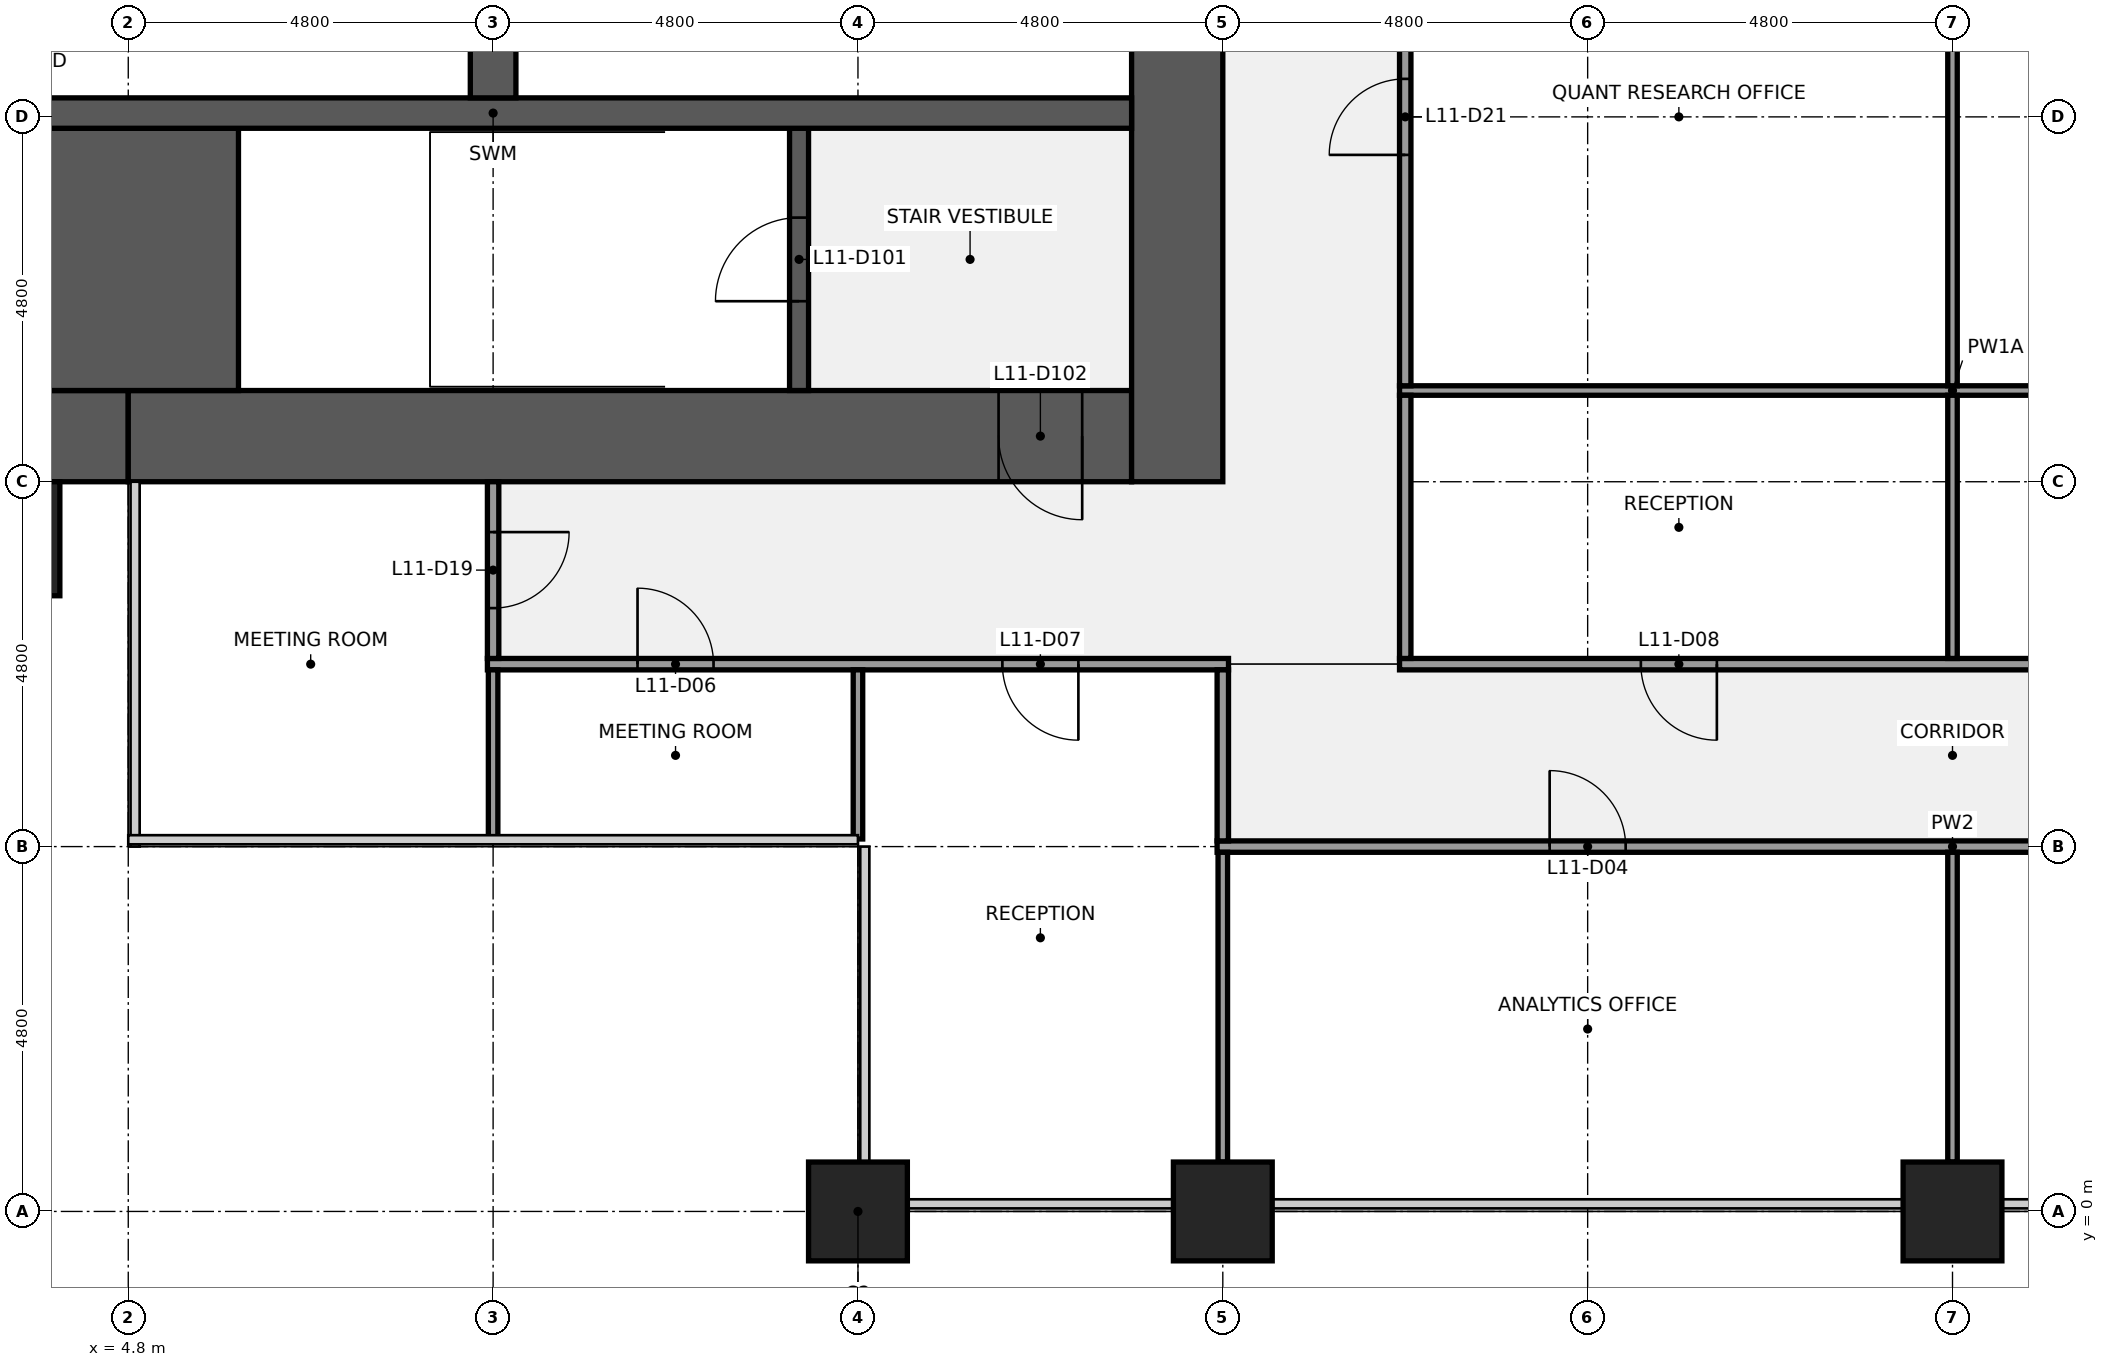
"""IFC4 building model, lengths in metres.
Left out: names, types, materials, properties, quantities, classifications, styles, units other than length and angle.
Written with IfcOpenShell. Run it as: python <this file> out.ifc"""

import sys

from ifc_helpers import new_model, si_unit, direction, frame, frame_2d, origin, origin_2d, place, context, subcontext, project, spatial, rectangle, extrude, element, fill, save


model = new_model("IFC4")
c1 = context("Model", 3, precision=1e-05, world=origin(), true_north=direction((0.0, 1.0)))
c2 = subcontext(c1, "Body", "Model", "MODEL_VIEW")
j1 = project(units=[si_unit("LENGTHUNIT", "METRE"), si_unit("PLANEANGLEUNIT", "RADIAN")], contexts=[c1])
p1 = place(None, origin())
s1 = spatial("IfcSite", under=j1, at=p1, CompositionType="ELEMENT")
p2 = place(p1, origin())
s2 = spatial("IfcBuilding", under=s1, at=p2, CompositionType="ELEMENT")
p3 = place(p2, frame((0.0, 0.0, 55.0)))
s3 = spatial("IfcBuildingStorey", under=s2, at=p3, CompositionType="ELEMENT", Elevation=55.0)
for number, where, z_axis, x_axis in (
    (1, (14.4, 0.0, 0.0), (0.0, 0.0, 1.0), (1.0, 0.0, 0.0)),
    (2, (19.2, 0.0, 0.0), (0.0, 0.0, 1.0), (1.0, 0.0, 0.0)),
    (3, (28.8, 0.0, 0.0), (0.0, 0.0, 1.0), (1.0, 0.0, 0.0)),
):
    element("IfcColumn", number, at=place(p3, frame(where, z_axis=z_axis, x_axis=x_axis)), inside=s3, PredefinedType="COLUMN", context=c2, shape_type="SweptSolid", body=[
        extrude(rectangle(XDim=1.3, YDim=1.3, at=origin_2d()), origin(), (0.0, 0.0, 1.0), 4.0),
    ])
p4 = place(p3, frame((4.8, 10.2, 0.0), z_axis=(0.0, 0.0, 1.0), x_axis=(-1.0, 0.0, 0.0)))
e4 = element("IfcWall", 4, at=p4, inside=s3, PredefinedType="SHEAR", context=c2, shape_type="SweptSolid", body=[
    extrude(rectangle(XDim=3.6, YDim=1.2, at=frame_2d((1.8, 0.0))), origin(), (0.0, 0.0, 1.0), 3.84),
])
p5 = place(p3, frame((18.0, 10.2, 0.0), z_axis=(0.0, 0.0, 1.0), x_axis=(-1.0, 0.0, 0.0)))
e5 = element("IfcWall", 5, at=p5, inside=s3, PredefinedType="SHEAR", context=c2, shape_type="SweptSolid", body=[
    extrude(rectangle(XDim=13.2, YDim=1.2, at=frame_2d((6.6, 0.0))), origin(), (0.0, 0.0, 1.0), 3.84),
])
p6 = place(p5, frame((0.65, 0.0, 0.0)))
e6 = element("IfcOpeningElement", 6, at=p6, cuts=e5, PredefinedType="OPENING", context=c2, shape_type="SweptSolid", body=[
    extrude(rectangle(XDim=1.1, YDim=2.1, at=frame_2d((0.55, 1.05))), frame((0.0, 0.61, 0.0), z_axis=(0.0, -1.0, 0.0), x_axis=(1.0, 0.0, 0.0)), (0.0, 0.0, 1.0), 1.22),
])
p7 = place(p3, frame((18.6, 38.4, 0.0), z_axis=(0.0, 0.0, 1.0), x_axis=(0.0, -1.0, 0.0)))
e7 = element("IfcWall", 7, at=p7, inside=s3, PredefinedType="SHEAR", context=c2, shape_type="SweptSolid", body=[
    extrude(rectangle(XDim=28.8, YDim=1.2, at=frame_2d((14.4, 0.0))), origin(), (0.0, 0.0, 1.0), 3.84),
])
p8 = place(p7, frame((18.3, 0.0, 0.0)))
e8 = element("IfcOpeningElement", 8, at=p8, cuts=e7, PredefinedType="OPENING", context=c2, shape_type="SweptSolid", body=[
    extrude(rectangle(XDim=1.8, YDim=2.1, at=frame_2d((0.9, 1.05))), frame((0.0, 0.61, 0.0), z_axis=(0.0, -1.0, 0.0), x_axis=(1.0, 0.0, 0.0)), (0.0, 0.0, 1.0), 1.22),
])
p9 = place(p7, frame((8.7, 0.0, 0.0)))
e9 = element("IfcOpeningElement", 9, at=p9, cuts=e7, PredefinedType="OPENING", context=c2, shape_type="SweptSolid", body=[
    extrude(rectangle(XDim=1.8, YDim=2.1, at=frame_2d((0.9, 1.05))), frame((0.0, 0.61, 0.0), z_axis=(0.0, -1.0, 0.0), x_axis=(1.0, 0.0, 0.0)), (0.0, 0.0, 1.0), 1.22),
])
p10 = place(p3, frame((1.2, 12.525, 0.0), z_axis=(0.0, 0.0, 1.0), x_axis=(1.0, 0.0, 0.0)))
e10 = element("IfcWall", 10, at=p10, inside=s3, PredefinedType="SHEAR", context=c2, shape_type="SweptSolid", body=[
    extrude(rectangle(XDim=5.05, YDim=3.45, at=frame_2d((2.525, 0.0))), origin(), (0.0, 0.0, 1.0), 3.84),
])
p11 = place(p3, frame((13.625, 10.8, 0.0), z_axis=(0.0, 0.0, 1.0), x_axis=(0.0, 1.0, 0.0)))
e11 = element("IfcWall", 11, at=p11, inside=s3, PredefinedType="SHEAR", context=c2, shape_type="SweptSolid", body=[
    extrude(rectangle(XDim=3.45, YDim=0.25, at=frame_2d((1.725, 0.0))), origin(), (0.0, 0.0, 1.0), 3.84),
])
p12 = place(p11, frame((1.175, 0.0, 0.0)))
e12 = element("IfcOpeningElement", 12, at=p12, cuts=e11, PredefinedType="OPENING", context=c2, shape_type="SweptSolid", body=[
    extrude(rectangle(XDim=1.1, YDim=2.1, at=frame_2d((0.55, 1.05))), frame((0.0, 0.135, 0.0), z_axis=(0.0, -1.0, 0.0), x_axis=(1.0, 0.0, 0.0)), (0.0, 0.0, 1.0), 0.27),
])
p13 = place(p3, frame((1.2, 14.45, 0.0), z_axis=(0.0, 0.0, 1.0), x_axis=(1.0, 0.0, 0.0)))
e13 = element("IfcWall", 13, at=p13, inside=s3, PredefinedType="SHEAR", context=c2, shape_type="SweptSolid", body=[
    extrude(rectangle(XDim=16.8, YDim=0.4, at=frame_2d((8.4, 0.0))), origin(), (0.0, 0.0, 1.0), 3.84),
])
p14 = place(p3, frame((9.6, 14.65, 0.0), z_axis=(0.0, 0.0, 1.0), x_axis=(0.0, 1.0, 0.0)))
e14 = element("IfcWall", 14, at=p14, inside=s3, PredefinedType="SHEAR", context=c2, shape_type="SweptSolid", body=[
    extrude(rectangle(XDim=2.6, YDim=0.6, at=frame_2d((1.3, 0.0))), origin(), (0.0, 0.0, 1.0), 3.84),
])
p15 = place(p3, frame((19.125, 4.8, 0.0), z_axis=(0.0, 0.0, 1.0), x_axis=(1.0, 0.0, 0.0)))
e15 = element("IfcWall", 15, at=p15, inside=s3, PredefinedType="PARTITIONING", context=c2, shape_type="SweptSolid", body=[
    extrude(rectangle(XDim=19.35, YDim=0.15, at=frame_2d((9.675, 0.0))), origin(), (0.0, 0.0, 1.0), 2.849),
])
p16 = place(p15, frame((4.375, 0.0, 0.0)))
e16 = element("IfcOpeningElement", 16, at=p16, cuts=e15, PredefinedType="OPENING", context=c2, shape_type="SweptSolid", body=[
    extrude(rectangle(XDim=1.0, YDim=2.1, at=frame_2d((0.5, 1.05))), frame((0.0, 0.085, 0.0), z_axis=(0.0, -1.0, 0.0), x_axis=(1.0, 0.0, 0.0)), (0.0, 0.0, 1.0), 0.17),
])
p17 = place(p15, frame((13.975, 0.0, 0.0)))
e17 = element("IfcOpeningElement", 17, at=p17, cuts=e15, PredefinedType="OPENING", context=c2, shape_type="SweptSolid", body=[
    extrude(rectangle(XDim=1.0, YDim=2.1, at=frame_2d((0.5, 1.05))), frame((0.0, 0.085, 0.0), z_axis=(0.0, -1.0, 0.0), x_axis=(1.0, 0.0, 0.0)), (0.0, 0.0, 1.0), 0.17),
])
p18 = place(p3, frame((9.525, 7.2, 0.0), z_axis=(0.0, 0.0, 1.0), x_axis=(1.0, 0.0, 0.0)))
e18 = element("IfcWall", 18, at=p18, inside=s3, PredefinedType="PARTITIONING", context=c2, shape_type="SweptSolid", body=[
    extrude(rectangle(XDim=9.75, YDim=0.15, at=frame_2d((4.875, 0.0))), origin(), (0.0, 0.0, 1.0), 2.849),
])
p19 = place(p18, frame((1.975, 0.0, 0.0)))
e19 = element("IfcOpeningElement", 19, at=p19, cuts=e18, PredefinedType="OPENING", context=c2, shape_type="SweptSolid", body=[
    extrude(rectangle(XDim=1.0, YDim=2.1, at=frame_2d((0.5, 1.05))), frame((0.0, 0.085, 0.0), z_axis=(0.0, -1.0, 0.0), x_axis=(1.0, 0.0, 0.0)), (0.0, 0.0, 1.0), 0.17),
])
p20 = place(p18, frame((6.775, 0.0, 0.0)))
e20 = element("IfcOpeningElement", 20, at=p20, cuts=e18, PredefinedType="OPENING", context=c2, shape_type="SweptSolid", body=[
    extrude(rectangle(XDim=1.0, YDim=2.1, at=frame_2d((0.5, 1.05))), frame((0.0, 0.085, 0.0), z_axis=(0.0, -1.0, 0.0), x_axis=(1.0, 0.0, 0.0)), (0.0, 0.0, 1.0), 0.17),
])
p21 = place(p3, frame((21.525, 7.2, 0.0), z_axis=(0.0, 0.0, 1.0), x_axis=(1.0, 0.0, 0.0)))
e21 = element("IfcWall", 21, at=p21, inside=s3, PredefinedType="PARTITIONING", context=c2, shape_type="SweptSolid", body=[
    extrude(rectangle(XDim=14.55, YDim=0.15, at=frame_2d((7.275, 0.0))), origin(), (0.0, 0.0, 1.0), 2.849),
])
p22 = place(p21, frame((3.175, 0.0, 0.0)))
e22 = element("IfcOpeningElement", 22, at=p22, cuts=e21, PredefinedType="OPENING", context=c2, shape_type="SweptSolid", body=[
    extrude(rectangle(XDim=1.0, YDim=2.1, at=frame_2d((0.5, 1.05))), frame((0.0, 0.085, 0.0), z_axis=(0.0, -1.0, 0.0), x_axis=(1.0, 0.0, 0.0)), (0.0, 0.0, 1.0), 0.17),
])
p23 = place(p21, frame((10.375, 0.0, 0.0)))
e23 = element("IfcOpeningElement", 23, at=p23, cuts=e21, PredefinedType="OPENING", context=c2, shape_type="SweptSolid", body=[
    extrude(rectangle(XDim=1.0, YDim=2.1, at=frame_2d((0.5, 1.05))), frame((0.0, 0.085, 0.0), z_axis=(0.0, -1.0, 0.0), x_axis=(1.0, 0.0, 0.0)), (0.0, 0.0, 1.0), 0.17),
])
p24 = place(p3, frame((21.525, 10.8, 0.0), z_axis=(0.0, 0.0, 1.0), x_axis=(1.0, 0.0, 0.0)))
e24 = element("IfcWall", 24, at=p24, inside=s3, PredefinedType="PARTITIONING", context=c2, shape_type="SweptSolid", body=[
    extrude(rectangle(XDim=14.55, YDim=0.125, at=frame_2d((7.275, 0.0))), origin(), (0.0, 0.0, 1.0), 2.849),
])
p25 = place(p3, frame((9.6, 4.9, 0.0), z_axis=(0.0, 0.0, 1.0), x_axis=(0.0, 1.0, 0.0)))
e25 = element("IfcWall", 25, at=p25, inside=s3, PredefinedType="PARTITIONING", context=c2, shape_type="SweptSolid", body=[
    extrude(rectangle(XDim=2.225, YDim=0.125, at=frame_2d((1.113, 0.0))), origin(), (0.0, 0.0, 1.0), 2.849),
])
p26 = place(p3, frame((9.6, 7.275, 0.0), z_axis=(0.0, 0.0, 1.0), x_axis=(0.0, 1.0, 0.0)))
e26 = element("IfcWall", 26, at=p26, inside=s3, PredefinedType="PARTITIONING", context=c2, shape_type="SweptSolid", body=[
    extrude(rectangle(XDim=2.325, YDim=0.15, at=frame_2d((1.163, 0.0))), origin(), (0.0, 0.0, 1.0), 2.849),
])
p27 = place(p26, frame((0.663, 0.0, 0.0)))
e27 = element("IfcOpeningElement", 27, at=p27, cuts=e26, PredefinedType="OPENING", context=c2, shape_type="SweptSolid", body=[
    extrude(rectangle(XDim=1.0, YDim=2.1, at=frame_2d((0.5, 1.05))), frame((0.0, 0.085, 0.0), z_axis=(0.0, -1.0, 0.0), x_axis=(1.0, 0.0, 0.0)), (0.0, 0.0, 1.0), 0.17),
])
p28 = place(p3, frame((14.4, 4.9, 0.0), z_axis=(0.0, 0.0, 1.0), x_axis=(0.0, 1.0, 0.0)))
e28 = element("IfcWall", 28, at=p28, inside=s3, PredefinedType="PARTITIONING", context=c2, shape_type="SweptSolid", body=[
    extrude(rectangle(XDim=2.225, YDim=0.125, at=frame_2d((1.113, 0.0))), origin(), (0.0, 0.0, 1.0), 2.849),
])
p29 = place(p3, frame((19.2, 0.65, 0.0), z_axis=(0.0, 0.0, 1.0), x_axis=(0.0, 1.0, 0.0)))
e29 = element("IfcWall", 29, at=p29, inside=s3, PredefinedType="PARTITIONING", context=c2, shape_type="SweptSolid", body=[
    extrude(rectangle(XDim=4.075, YDim=0.125, at=frame_2d((2.038, 0.0))), origin(), (0.0, 0.0, 1.0), 2.849),
])
p30 = place(p3, frame((19.2, 4.875, 0.0), z_axis=(0.0, 0.0, 1.0), x_axis=(0.0, 1.0, 0.0)))
e30 = element("IfcWall", 30, at=p30, inside=s3, PredefinedType="PARTITIONING", context=c2, shape_type="SweptSolid", body=[
    extrude(rectangle(XDim=2.25, YDim=0.15, at=frame_2d((1.125, 0.0))), origin(), (0.0, 0.0, 1.0), 2.849),
])
p31 = place(p3, frame((21.6, 7.275, 0.0), z_axis=(0.0, 0.0, 1.0), x_axis=(0.0, 1.0, 0.0)))
e31 = element("IfcWall", 31, at=p31, inside=s3, PredefinedType="PARTITIONING", context=c2, shape_type="SweptSolid", body=[
    extrude(rectangle(XDim=3.463, YDim=0.15, at=frame_2d((1.731, 0.0))), origin(), (0.0, 0.0, 1.0), 2.849),
])
p32 = place(p3, frame((21.6, 10.863, 0.0), z_axis=(0.0, 0.0, 1.0), x_axis=(0.0, 1.0, 0.0)))
e32 = element("IfcWall", 32, at=p32, inside=s3, PredefinedType="PARTITIONING", context=c2, shape_type="SweptSolid", body=[
    extrude(rectangle(XDim=7.075, YDim=0.15, at=frame_2d((3.538, 0.0))), origin(), (0.0, 0.0, 1.0), 2.849),
])
p33 = place(p32, frame((3.038, 0.0, 0.0)))
e33 = element("IfcOpeningElement", 33, at=p33, cuts=e32, PredefinedType="OPENING", context=c2, shape_type="SweptSolid", body=[
    extrude(rectangle(XDim=1.0, YDim=2.1, at=frame_2d((0.5, 1.05))), frame((0.0, 0.085, 0.0), z_axis=(0.0, -1.0, 0.0), x_axis=(1.0, 0.0, 0.0)), (0.0, 0.0, 1.0), 0.17),
])
p34 = place(p3, frame((28.8, 0.65, 0.0), z_axis=(0.0, 0.0, 1.0), x_axis=(0.0, 1.0, 0.0)))
e34 = element("IfcWall", 34, at=p34, inside=s3, PredefinedType="PARTITIONING", context=c2, shape_type="SweptSolid", body=[
    extrude(rectangle(XDim=4.075, YDim=0.125, at=frame_2d((2.038, 0.0))), origin(), (0.0, 0.0, 1.0), 2.849),
])
p35 = place(p3, frame((28.8, 7.275, 0.0), z_axis=(0.0, 0.0, 1.0), x_axis=(0.0, 1.0, 0.0)))
e35 = element("IfcWall", 35, at=p35, inside=s3, PredefinedType="PARTITIONING", context=c2, shape_type="SweptSolid", body=[
    extrude(rectangle(XDim=3.463, YDim=0.125, at=frame_2d((1.731, 0.0))), origin(), (0.0, 0.0, 1.0), 2.849),
])
p36 = place(p3, frame((28.8, 10.863, 0.0), z_axis=(0.0, 0.0, 1.0), x_axis=(0.0, 1.0, 0.0)))
e36 = element("IfcWall", 36, at=p36, inside=s3, PredefinedType="PARTITIONING", context=c2, shape_type="SweptSolid", body=[
    extrude(rectangle(XDim=7.075, YDim=0.125, at=frame_2d((3.538, 0.0))), origin(), (0.0, 0.0, 1.0), 2.849),
])
p37 = place(p3, frame((2.4, 8.85, 0.0), z_axis=(0.0, 0.0, 1.0), x_axis=(1.0, 0.0, 0.0)))
e37 = element("IfcColumn", 37, at=p37, inside=s3, PredefinedType="PILASTER", context=c2, shape_type="SweptSolid", body=[
    extrude(rectangle(XDim=3.0, YDim=1.5, at=origin_2d()), origin(), (0.0, 0.0, 1.0), 4.0),
])
for number, where, z_axis, x_axis in (
    (38, (14.4, -1.075, 0.0), (0.0, 0.0, 1.0), (1.0, 0.0, 0.0)),
    (39, (19.2, -1.075, 0.0), (0.0, 0.0, 1.0), (1.0, 0.0, 0.0)),
):
    element("IfcColumn", number, at=place(p3, frame(where, z_axis=z_axis, x_axis=x_axis)), inside=s3, PredefinedType="PILASTER", context=c2, shape_type="SweptSolid", body=[
        extrude(rectangle(XDim=4.2, YDim=0.85, at=origin_2d()), origin(), (0.0, 0.0, 1.0), 4.0),
    ])
p38 = place(p12, origin())
e40 = element("IfcDoor", 40, at=p38, inside=s3, OperationType="SINGLE_SWING_LEFT", PredefinedType="DOOR", context=c2, shape_type="SweptSolid", body=[
    extrude(rectangle(XDim=1.1, YDim=2.1, at=frame_2d((0.55, 1.05))), frame((0.0, 0.025, 0.0), z_axis=(0.0, -1.0, 0.0), x_axis=(1.0, 0.0, 0.0)), (0.0, 0.0, 1.0), 0.05),
])
fill(e12, e40)
p39 = place(p6, origin())
e41 = element("IfcDoor", 41, at=p39, inside=s3, OperationType="SINGLE_SWING_LEFT", PredefinedType="DOOR", context=c2, shape_type="SweptSolid", body=[
    extrude(rectangle(XDim=1.1, YDim=2.1, at=frame_2d((0.55, 1.05))), frame((0.0, 0.025, 0.0), z_axis=(0.0, -1.0, 0.0), x_axis=(1.0, 0.0, 0.0)), (0.0, 0.0, 1.0), 0.05),
])
fill(e6, e41)
p40 = place(p16, origin())
e42 = element("IfcDoor", 42, at=p40, inside=s3, OperationType="SINGLE_SWING_LEFT", PredefinedType="DOOR", context=c2, shape_type="SweptSolid", body=[
    extrude(rectangle(XDim=1.0, YDim=2.1, at=frame_2d((0.5, 1.05))), frame((0.0, 0.025, 0.0), z_axis=(0.0, -1.0, 0.0), x_axis=(1.0, 0.0, 0.0)), (0.0, 0.0, 1.0), 0.05),
])
fill(e16, e42)
p41 = place(p19, origin())
e43 = element("IfcDoor", 43, at=p41, inside=s3, OperationType="SINGLE_SWING_LEFT", PredefinedType="DOOR", context=c2, shape_type="SweptSolid", body=[
    extrude(rectangle(XDim=1.0, YDim=2.1, at=frame_2d((0.5, 1.05))), frame((0.0, 0.025, 0.0), z_axis=(0.0, -1.0, 0.0), x_axis=(1.0, 0.0, 0.0)), (0.0, 0.0, 1.0), 0.05),
])
fill(e19, e43)
p42 = place(p20, origin())
e44 = element("IfcDoor", 44, at=p42, inside=s3, OperationType="SINGLE_SWING_RIGHT", PredefinedType="DOOR", context=c2, shape_type="SweptSolid", body=[
    extrude(rectangle(XDim=1.0, YDim=2.1, at=frame_2d((0.5, 1.05))), frame((0.0, 0.025, 0.0), z_axis=(0.0, -1.0, 0.0), x_axis=(1.0, 0.0, 0.0)), (0.0, 0.0, 1.0), 0.05),
])
fill(e20, e44)
p43 = place(p22, origin())
e45 = element("IfcDoor", 45, at=p43, inside=s3, OperationType="SINGLE_SWING_RIGHT", PredefinedType="DOOR", context=c2, shape_type="SweptSolid", body=[
    extrude(rectangle(XDim=1.0, YDim=2.1, at=frame_2d((0.5, 1.05))), frame((0.0, 0.025, 0.0), z_axis=(0.0, -1.0, 0.0), x_axis=(1.0, 0.0, 0.0)), (0.0, 0.0, 1.0), 0.05),
])
fill(e22, e45)
p44 = place(p27, origin())
e46 = element("IfcDoor", 46, at=p44, inside=s3, OperationType="SINGLE_SWING_RIGHT", PredefinedType="DOOR", context=c2, shape_type="SweptSolid", body=[
    extrude(rectangle(XDim=1.0, YDim=2.1, at=frame_2d((0.5, 1.05))), frame((0.0, 0.025, 0.0), z_axis=(0.0, -1.0, 0.0), x_axis=(1.0, 0.0, 0.0)), (0.0, 0.0, 1.0), 0.05),
])
fill(e27, e46)
p45 = place(p33, origin())
e47 = element("IfcDoor", 47, at=p45, inside=s3, OperationType="SINGLE_SWING_LEFT", PredefinedType="DOOR", context=c2, shape_type="SweptSolid", body=[
    extrude(rectangle(XDim=1.0, YDim=2.1, at=frame_2d((0.5, 1.05))), frame((0.0, 0.025, 0.0), z_axis=(0.0, -1.0, 0.0), x_axis=(1.0, 0.0, 0.0)), (0.0, 0.0, 1.0), 0.05),
])
fill(e33, e47)
save(model, sys.argv[1])
